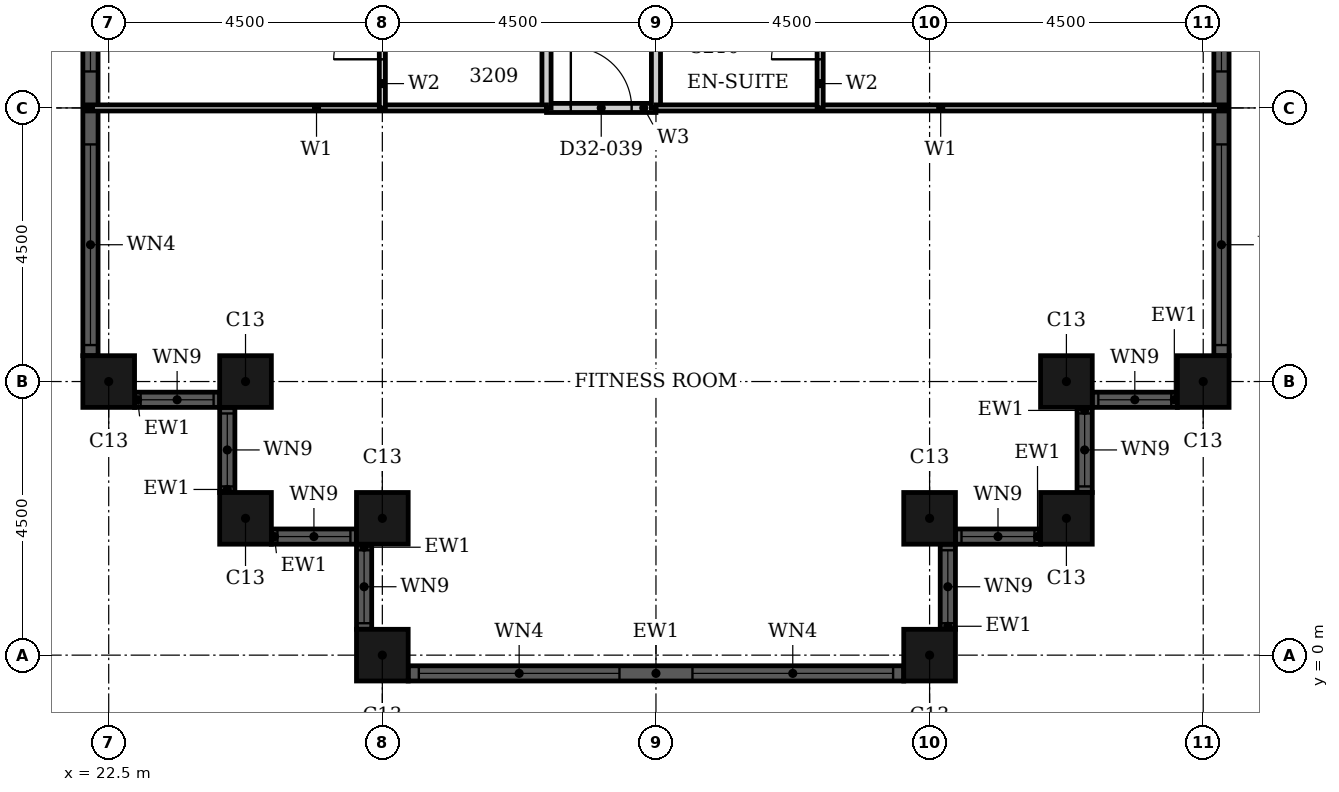
"""IFC4 building model, lengths in metres.
Left out: names, types, materials, properties, quantities, classifications, styles, units other than length and angle.
Written with IfcOpenShell. Run it as: python <this file> out.ifc"""

import sys

from ifc_helpers import new_model, si_unit, direction, frame, frame_2d, origin, origin_2d, place, context, subcontext, project, spatial, rectangle, hollow_rectangle, extrude, element, fill, save


model = new_model("IFC4")
c1 = context("Model", 3, precision=1e-05, world=origin(), true_north=direction((0.0, 1.0)))
c2 = subcontext(c1, "Body", "Model", "MODEL_VIEW")
j1 = project(units=[si_unit("LENGTHUNIT", "METRE"), si_unit("PLANEANGLEUNIT", "RADIAN")], contexts=[c1])
p1 = place(None, origin())
s1 = spatial("IfcSite", under=j1, at=p1, CompositionType="ELEMENT")
p2 = place(p1, origin())
s2 = spatial("IfcBuilding", under=s1, at=p2, CompositionType="ELEMENT")
p3 = place(p2, frame((0.0, 0.0, 129.6)))
s3 = spatial("IfcBuildingStorey", under=s2, at=p3, CompositionType="ELEMENT", Elevation=129.6)
for number, where, z_axis, x_axis in (
    (1, (22.5, 4.5, 0.0), (0.0, 0.0, 1.0), (1.0, 0.0, 0.0)),
    (2, (24.75, 4.5, 0.0), (0.0, 0.0, 1.0), (1.0, 0.0, 0.0)),
    (3, (24.75, 2.25, 0.0), (0.0, 0.0, 1.0), (1.0, 0.0, 0.0)),
    (4, (27.0, 2.25, 0.0), (0.0, 0.0, 1.0), (1.0, 0.0, 0.0)),
    (5, (27.0, 0.0, 0.0), (0.0, 0.0, 1.0), (1.0, 0.0, 0.0)),
    (6, (36.0, 0.0, 0.0), (0.0, 0.0, 1.0), (1.0, 0.0, 0.0)),
    (7, (36.0, 2.25, 0.0), (0.0, 0.0, 1.0), (1.0, 0.0, 0.0)),
    (8, (38.25, 2.25, 0.0), (0.0, 0.0, 1.0), (1.0, 0.0, 0.0)),
    (9, (38.25, 4.5, 0.0), (0.0, 0.0, 1.0), (1.0, 0.0, 0.0)),
    (10, (40.5, 4.5, 0.0), (0.0, 0.0, 1.0), (1.0, 0.0, 0.0)),
):
    element("IfcColumn", number, at=place(p3, frame(where, z_axis=z_axis, x_axis=x_axis)), inside=s3, PredefinedType="COLUMN", context=c2, shape_type="SweptSolid", body=[
        extrude(hollow_rectangle(XDim=0.85, YDim=0.85, WallThickness=0.026, at=origin_2d()), origin(), (0.0, 0.0, 1.0), 3.6),
    ])
p4 = place(p3, frame((22.925, 4.2, 0.0), z_axis=(0.0, 0.0, 1.0), x_axis=(1.0, 0.0, 0.0)))
e11 = element("IfcWall", 11, at=p4, inside=s3, PredefinedType="SOLIDWALL", context=c2, shape_type="SweptSolid", body=[
    extrude(rectangle(XDim=1.4, YDim=0.25, at=frame_2d((0.7, 0.0))), origin(), (0.0, 0.0, 1.0), 3.6),
])
p5 = place(p4, frame((0.1, 0.0, 0.9)))
e12 = element("IfcOpeningElement", 12, at=p5, cuts=e11, PredefinedType="OPENING", context=c2, shape_type="SweptSolid", body=[
    extrude(rectangle(XDim=1.2, YDim=2.08, at=frame_2d((0.6, 1.04))), frame((0.0, 0.135, 0.0), z_axis=(0.0, -1.0, 0.0), x_axis=(1.0, 0.0, 0.0)), (0.0, 0.0, 1.0), 0.27),
])
p6 = place(p3, frame((24.45, 4.075, 0.0), z_axis=(0.0, 0.0, 1.0), x_axis=(0.0, -1.0, 0.0)))
e13 = element("IfcWall", 13, at=p6, inside=s3, PredefinedType="SOLIDWALL", context=c2, shape_type="SweptSolid", body=[
    extrude(rectangle(XDim=1.4, YDim=0.25, at=frame_2d((0.7, 0.0))), origin(), (0.0, 0.0, 1.0), 3.6),
])
p7 = place(p6, frame((0.1, 0.0, 0.9)))
e14 = element("IfcOpeningElement", 14, at=p7, cuts=e13, PredefinedType="OPENING", context=c2, shape_type="SweptSolid", body=[
    extrude(rectangle(XDim=1.2, YDim=2.08, at=frame_2d((0.6, 1.04))), frame((0.0, 0.135, 0.0), z_axis=(0.0, -1.0, 0.0), x_axis=(1.0, 0.0, 0.0)), (0.0, 0.0, 1.0), 0.27),
])
p8 = place(p3, frame((25.175, 1.95, 0.0), z_axis=(0.0, 0.0, 1.0), x_axis=(1.0, 0.0, 0.0)))
e15 = element("IfcWall", 15, at=p8, inside=s3, PredefinedType="SOLIDWALL", context=c2, shape_type="SweptSolid", body=[
    extrude(rectangle(XDim=1.4, YDim=0.25, at=frame_2d((0.7, 0.0))), origin(), (0.0, 0.0, 1.0), 3.6),
])
p9 = place(p8, frame((0.1, 0.0, 0.9)))
e16 = element("IfcOpeningElement", 16, at=p9, cuts=e15, PredefinedType="OPENING", context=c2, shape_type="SweptSolid", body=[
    extrude(rectangle(XDim=1.2, YDim=2.08, at=frame_2d((0.6, 1.04))), frame((0.0, 0.135, 0.0), z_axis=(0.0, -1.0, 0.0), x_axis=(1.0, 0.0, 0.0)), (0.0, 0.0, 1.0), 0.27),
])
p10 = place(p3, frame((26.7, 1.825, 0.0), z_axis=(0.0, 0.0, 1.0), x_axis=(0.0, -1.0, 0.0)))
e17 = element("IfcWall", 17, at=p10, inside=s3, PredefinedType="SOLIDWALL", context=c2, shape_type="SweptSolid", body=[
    extrude(rectangle(XDim=1.4, YDim=0.25, at=frame_2d((0.7, 0.0))), origin(), (0.0, 0.0, 1.0), 3.6),
])
p11 = place(p10, frame((0.1, 0.0, 0.9)))
e18 = element("IfcOpeningElement", 18, at=p11, cuts=e17, PredefinedType="OPENING", context=c2, shape_type="SweptSolid", body=[
    extrude(rectangle(XDim=1.2, YDim=2.08, at=frame_2d((0.6, 1.04))), frame((0.0, 0.135, 0.0), z_axis=(0.0, -1.0, 0.0), x_axis=(1.0, 0.0, 0.0)), (0.0, 0.0, 1.0), 0.27),
])
p12 = place(p3, frame((27.425, -0.3, 0.0), z_axis=(0.0, 0.0, 1.0), x_axis=(1.0, 0.0, 0.0)))
e19 = element("IfcWall", 19, at=p12, inside=s3, PredefinedType="SOLIDWALL", context=c2, shape_type="SweptSolid", body=[
    extrude(rectangle(XDim=8.15, YDim=0.25, at=frame_2d((4.075, 0.0))), origin(), (0.0, 0.0, 1.0), 3.6),
])
p13 = place(p12, frame((0.175, 0.0, 0.9)))
e20 = element("IfcOpeningElement", 20, at=p13, cuts=e19, PredefinedType="OPENING", context=c2, shape_type="SweptSolid", body=[
    extrude(rectangle(XDim=3.3, YDim=2.08, at=frame_2d((1.65, 1.04))), frame((0.0, 0.135, 0.0), z_axis=(0.0, -1.0, 0.0), x_axis=(1.0, 0.0, 0.0)), (0.0, 0.0, 1.0), 0.27),
])
p14 = place(p12, frame((4.675, 0.0, 0.9)))
e21 = element("IfcOpeningElement", 21, at=p14, cuts=e19, PredefinedType="OPENING", context=c2, shape_type="SweptSolid", body=[
    extrude(rectangle(XDim=3.3, YDim=2.08, at=frame_2d((1.65, 1.04))), frame((0.0, 0.135, 0.0), z_axis=(0.0, -1.0, 0.0), x_axis=(1.0, 0.0, 0.0)), (0.0, 0.0, 1.0), 0.27),
])
p15 = place(p3, frame((36.3, 0.425, 0.0), z_axis=(0.0, 0.0, 1.0), x_axis=(0.0, 1.0, 0.0)))
e22 = element("IfcWall", 22, at=p15, inside=s3, PredefinedType="SOLIDWALL", context=c2, shape_type="SweptSolid", body=[
    extrude(rectangle(XDim=1.4, YDim=0.25, at=frame_2d((0.7, 0.0))), origin(), (0.0, 0.0, 1.0), 3.6),
])
p16 = place(p15, frame((0.1, 0.0, 0.9)))
e23 = element("IfcOpeningElement", 23, at=p16, cuts=e22, PredefinedType="OPENING", context=c2, shape_type="SweptSolid", body=[
    extrude(rectangle(XDim=1.2, YDim=2.08, at=frame_2d((0.6, 1.04))), frame((0.0, 0.135, 0.0), z_axis=(0.0, -1.0, 0.0), x_axis=(1.0, 0.0, 0.0)), (0.0, 0.0, 1.0), 0.27),
])
p17 = place(p3, frame((36.425, 1.95, 0.0), z_axis=(0.0, 0.0, 1.0), x_axis=(1.0, 0.0, 0.0)))
e24 = element("IfcWall", 24, at=p17, inside=s3, PredefinedType="SOLIDWALL", context=c2, shape_type="SweptSolid", body=[
    extrude(rectangle(XDim=1.4, YDim=0.25, at=frame_2d((0.7, 0.0))), origin(), (0.0, 0.0, 1.0), 3.6),
])
p18 = place(p17, frame((0.1, 0.0, 0.9)))
e25 = element("IfcOpeningElement", 25, at=p18, cuts=e24, PredefinedType="OPENING", context=c2, shape_type="SweptSolid", body=[
    extrude(rectangle(XDim=1.2, YDim=2.08, at=frame_2d((0.6, 1.04))), frame((0.0, 0.135, 0.0), z_axis=(0.0, -1.0, 0.0), x_axis=(1.0, 0.0, 0.0)), (0.0, 0.0, 1.0), 0.27),
])
p19 = place(p3, frame((38.55, 2.675, 0.0), z_axis=(0.0, 0.0, 1.0), x_axis=(0.0, 1.0, 0.0)))
e26 = element("IfcWall", 26, at=p19, inside=s3, PredefinedType="SOLIDWALL", context=c2, shape_type="SweptSolid", body=[
    extrude(rectangle(XDim=1.4, YDim=0.25, at=frame_2d((0.7, 0.0))), origin(), (0.0, 0.0, 1.0), 3.6),
])
p20 = place(p19, frame((0.1, 0.0, 0.9)))
e27 = element("IfcOpeningElement", 27, at=p20, cuts=e26, PredefinedType="OPENING", context=c2, shape_type="SweptSolid", body=[
    extrude(rectangle(XDim=1.2, YDim=2.08, at=frame_2d((0.6, 1.04))), frame((0.0, 0.135, 0.0), z_axis=(0.0, -1.0, 0.0), x_axis=(1.0, 0.0, 0.0)), (0.0, 0.0, 1.0), 0.27),
])
p21 = place(p3, frame((38.675, 4.2, 0.0), z_axis=(0.0, 0.0, 1.0), x_axis=(1.0, 0.0, 0.0)))
e28 = element("IfcWall", 28, at=p21, inside=s3, PredefinedType="SOLIDWALL", context=c2, shape_type="SweptSolid", body=[
    extrude(rectangle(XDim=1.4, YDim=0.25, at=frame_2d((0.7, 0.0))), origin(), (0.0, 0.0, 1.0), 3.6),
])
p22 = place(p21, frame((0.1, 0.0, 0.9)))
e29 = element("IfcOpeningElement", 29, at=p22, cuts=e28, PredefinedType="OPENING", context=c2, shape_type="SweptSolid", body=[
    extrude(rectangle(XDim=1.2, YDim=2.08, at=frame_2d((0.6, 1.04))), frame((0.0, 0.135, 0.0), z_axis=(0.0, -1.0, 0.0), x_axis=(1.0, 0.0, 0.0)), (0.0, 0.0, 1.0), 0.27),
])
p23 = place(p3, frame((40.8, 4.925, 0.0), z_axis=(0.0, 0.0, 1.0), x_axis=(0.0, 1.0, 0.0)))
e30 = element("IfcWall", 30, at=p23, inside=s3, PredefinedType="SOLIDWALL", context=c2, shape_type="SweptSolid", body=[
    extrude(rectangle(XDim=8.15, YDim=0.25, at=frame_2d((4.075, 0.0))), origin(), (0.0, 0.0, 1.0), 3.6),
])
p24 = place(p23, frame((0.175, 0.0, 0.9)))
e31 = element("IfcOpeningElement", 31, at=p24, cuts=e30, PredefinedType="OPENING", context=c2, shape_type="SweptSolid", body=[
    extrude(rectangle(XDim=3.3, YDim=2.08, at=frame_2d((1.65, 1.04))), frame((0.0, 0.135, 0.0), z_axis=(0.0, -1.0, 0.0), x_axis=(1.0, 0.0, 0.0)), (0.0, 0.0, 1.0), 0.27),
])
p25 = place(p23, frame((4.675, 0.0, 0.9)))
e32 = element("IfcOpeningElement", 32, at=p25, cuts=e30, PredefinedType="OPENING", context=c2, shape_type="SweptSolid", body=[
    extrude(rectangle(XDim=3.3, YDim=2.08, at=frame_2d((1.65, 1.04))), frame((0.0, 0.135, 0.0), z_axis=(0.0, -1.0, 0.0), x_axis=(1.0, 0.0, 0.0)), (0.0, 0.0, 1.0), 0.27),
])
p26 = place(p3, frame((22.2, 13.075, 0.0), z_axis=(0.0, 0.0, 1.0), x_axis=(0.0, -1.0, 0.0)))
e33 = element("IfcWall", 33, at=p26, inside=s3, PredefinedType="SOLIDWALL", context=c2, shape_type="SweptSolid", body=[
    extrude(rectangle(XDim=8.15, YDim=0.25, at=frame_2d((4.075, 0.0))), origin(), (0.0, 0.0, 1.0), 3.6),
])
p27 = place(p26, frame((0.175, 0.0, 0.9)))
e34 = element("IfcOpeningElement", 34, at=p27, cuts=e33, PredefinedType="OPENING", context=c2, shape_type="SweptSolid", body=[
    extrude(rectangle(XDim=3.3, YDim=2.08, at=frame_2d((1.65, 1.04))), frame((0.0, 0.135, 0.0), z_axis=(0.0, -1.0, 0.0), x_axis=(1.0, 0.0, 0.0)), (0.0, 0.0, 1.0), 0.27),
])
p28 = place(p26, frame((4.675, 0.0, 0.9)))
e35 = element("IfcOpeningElement", 35, at=p28, cuts=e33, PredefinedType="OPENING", context=c2, shape_type="SweptSolid", body=[
    extrude(rectangle(XDim=3.3, YDim=2.08, at=frame_2d((1.65, 1.04))), frame((0.0, 0.135, 0.0), z_axis=(0.0, -1.0, 0.0), x_axis=(1.0, 0.0, 0.0)), (0.0, 0.0, 1.0), 0.27),
])
p29 = place(p3, frame((29.7, 9.0, 0.0), z_axis=(0.0, 0.0, 1.0), x_axis=(1.0, 0.0, 0.0)))
e36 = element("IfcWall", 36, at=p29, inside=s3, PredefinedType="PARTITIONING", context=c2, shape_type="SweptSolid", body=[
    extrude(rectangle(XDim=1.8, YDim=0.15, at=frame_2d((0.9, 0.0))), origin(), (0.0, 0.0, 1.0), 3.3),
])
p30 = place(p29, frame((0.4, 0.0, 0.0)))
e37 = element("IfcOpeningElement", 37, at=p30, cuts=e36, PredefinedType="OPENING", context=c2, shape_type="SweptSolid", body=[
    extrude(rectangle(XDim=1.0, YDim=2.1, at=frame_2d((0.5, 1.05))), frame((0.0, 0.085, 0.0), z_axis=(0.0, -1.0, 0.0), x_axis=(1.0, 0.0, 0.0)), (0.0, 0.0, 1.0), 0.17),
])
p31 = place(p3, frame((29.7, 9.0, 0.0), z_axis=(0.0, 0.0, 1.0), x_axis=(0.0, 1.0, 0.0)))
e38 = element("IfcWall", 38, at=p31, inside=s3, PredefinedType="PARTITIONING", context=c2, shape_type="SweptSolid", body=[
    extrude(rectangle(XDim=11.7, YDim=0.15, at=frame_2d((5.85, 0.0))), origin(), (0.0, 0.0, 1.0), 3.3),
])
p32 = place(p31, frame((2.95, 0.0, 0.0)))
e39 = element("IfcOpeningElement", 39, at=p32, cuts=e38, PredefinedType="OPENING", context=c2, shape_type="SweptSolid", body=[
    extrude(rectangle(XDim=1.0, YDim=2.1, at=frame_2d((0.5, 1.05))), frame((0.0, 0.085, 0.0), z_axis=(0.0, -1.0, 0.0), x_axis=(1.0, 0.0, 0.0)), (0.0, 0.0, 1.0), 0.17),
])
p33 = place(p3, frame((31.5, 9.0, 0.0), z_axis=(0.0, 0.0, 1.0), x_axis=(0.0, 1.0, 0.0)))
e40 = element("IfcWall", 40, at=p33, inside=s3, PredefinedType="PARTITIONING", context=c2, shape_type="SweptSolid", body=[
    extrude(rectangle(XDim=11.7, YDim=0.15, at=frame_2d((5.85, 0.0))), origin(), (0.0, 0.0, 1.0), 2.58),
])
p34 = place(p33, frame((2.95, 0.0, 0.0)))
e41 = element("IfcOpeningElement", 41, at=p34, cuts=e40, PredefinedType="OPENING", context=c2, shape_type="SweptSolid", body=[
    extrude(rectangle(XDim=1.0, YDim=2.1, at=frame_2d((0.5, 1.05))), frame((0.0, 0.085, 0.0), z_axis=(0.0, -1.0, 0.0), x_axis=(1.0, 0.0, 0.0)), (0.0, 0.0, 1.0), 0.17),
])
p35 = place(p3, frame((31.5, 9.0, 0.0), z_axis=(0.0, 0.0, 1.0), x_axis=(1.0, 0.0, 0.0)))
e42 = element("IfcWall", 42, at=p35, inside=s3, PredefinedType="PARTITIONING", context=c2, shape_type="SweptSolid", body=[
    extrude(rectangle(XDim=9.365, YDim=0.1, at=frame_2d((4.683, 0.0))), origin(), (0.0, 0.0, 1.0), 3.3),
])
p36 = place(p3, frame((22.135, 9.0, 0.0), z_axis=(0.0, 0.0, 1.0), x_axis=(1.0, 0.0, 0.0)))
e43 = element("IfcWall", 43, at=p36, inside=s3, PredefinedType="PARTITIONING", context=c2, shape_type="SweptSolid", body=[
    extrude(rectangle(XDim=7.565, YDim=0.1, at=frame_2d((3.782, 0.0))), origin(), (0.0, 0.0, 1.0), 3.3),
])
p37 = place(p3, frame((27.0, 9.0, 0.0), z_axis=(0.0, 0.0, 1.0), x_axis=(0.0, 1.0, 0.0)))
e44 = element("IfcWall", 44, at=p37, inside=s3, PredefinedType="PARTITIONING", context=c2, shape_type="SweptSolid", body=[
    extrude(rectangle(XDim=2.4, YDim=0.1, at=frame_2d((1.2, 0.0))), origin(), (0.0, 0.0, 1.0), 2.58),
])
p38 = place(p37, frame((0.8, 0.0, 0.0)))
e45 = element("IfcOpeningElement", 45, at=p38, cuts=e44, PredefinedType="OPENING", context=c2, shape_type="SweptSolid", body=[
    extrude(rectangle(XDim=0.8, YDim=2.1, at=frame_2d((0.4, 1.05))), frame((0.0, 0.06, 0.0), z_axis=(0.0, -1.0, 0.0), x_axis=(1.0, 0.0, 0.0)), (0.0, 0.0, 1.0), 0.12),
])
p39 = place(p3, frame((34.2, 9.0, 0.0), z_axis=(0.0, 0.0, 1.0), x_axis=(0.0, 1.0, 0.0)))
e46 = element("IfcWall", 46, at=p39, inside=s3, PredefinedType="PARTITIONING", context=c2, shape_type="SweptSolid", body=[
    extrude(rectangle(XDim=2.4, YDim=0.1, at=frame_2d((1.2, 0.0))), origin(), (0.0, 0.0, 1.0), 3.3),
])
p40 = place(p39, frame((0.8, 0.0, 0.0)))
e47 = element("IfcOpeningElement", 47, at=p40, cuts=e46, PredefinedType="OPENING", context=c2, shape_type="SweptSolid", body=[
    extrude(rectangle(XDim=0.8, YDim=2.1, at=frame_2d((0.4, 1.05))), frame((0.0, 0.06, 0.0), z_axis=(0.0, -1.0, 0.0), x_axis=(1.0, 0.0, 0.0)), (0.0, 0.0, 1.0), 0.12),
])
p41 = place(p5, origin())
e48 = element("IfcWindow", 48, at=p41, inside=s3, PartitioningType="SINGLE_PANEL", PredefinedType="WINDOW", context=c2, shape_type="SweptSolid", body=[
    extrude(rectangle(XDim=1.2, YDim=2.08, at=frame_2d((0.6, 1.04))), frame((0.0, 0.03, 0.0), z_axis=(0.0, -1.0, 0.0), x_axis=(1.0, 0.0, 0.0)), (0.0, 0.0, 1.0), 0.06),
])
fill(e12, e48)
p42 = place(p7, origin())
e49 = element("IfcWindow", 49, at=p42, inside=s3, PartitioningType="SINGLE_PANEL", PredefinedType="WINDOW", context=c2, shape_type="SweptSolid", body=[
    extrude(rectangle(XDim=1.2, YDim=2.08, at=frame_2d((0.6, 1.04))), frame((0.0, 0.03, 0.0), z_axis=(0.0, -1.0, 0.0), x_axis=(1.0, 0.0, 0.0)), (0.0, 0.0, 1.0), 0.06),
])
fill(e14, e49)
p43 = place(p9, origin())
e50 = element("IfcWindow", 50, at=p43, inside=s3, PartitioningType="SINGLE_PANEL", PredefinedType="WINDOW", context=c2, shape_type="SweptSolid", body=[
    extrude(rectangle(XDim=1.2, YDim=2.08, at=frame_2d((0.6, 1.04))), frame((0.0, 0.03, 0.0), z_axis=(0.0, -1.0, 0.0), x_axis=(1.0, 0.0, 0.0)), (0.0, 0.0, 1.0), 0.06),
])
fill(e16, e50)
p44 = place(p11, origin())
e51 = element("IfcWindow", 51, at=p44, inside=s3, PartitioningType="SINGLE_PANEL", PredefinedType="WINDOW", context=c2, shape_type="SweptSolid", body=[
    extrude(rectangle(XDim=1.2, YDim=2.08, at=frame_2d((0.6, 1.04))), frame((0.0, 0.03, 0.0), z_axis=(0.0, -1.0, 0.0), x_axis=(1.0, 0.0, 0.0)), (0.0, 0.0, 1.0), 0.06),
])
fill(e18, e51)
p45 = place(p13, origin())
e52 = element("IfcWindow", 52, at=p45, inside=s3, PartitioningType="SINGLE_PANEL", PredefinedType="WINDOW", context=c2, shape_type="SweptSolid", body=[
    extrude(rectangle(XDim=3.3, YDim=2.08, at=frame_2d((1.65, 1.04))), frame((0.0, 0.03, 0.0), z_axis=(0.0, -1.0, 0.0), x_axis=(1.0, 0.0, 0.0)), (0.0, 0.0, 1.0), 0.06),
])
fill(e20, e52)
p46 = place(p14, origin())
e53 = element("IfcWindow", 53, at=p46, inside=s3, PartitioningType="SINGLE_PANEL", PredefinedType="WINDOW", context=c2, shape_type="SweptSolid", body=[
    extrude(rectangle(XDim=3.3, YDim=2.08, at=frame_2d((1.65, 1.04))), frame((0.0, 0.03, 0.0), z_axis=(0.0, -1.0, 0.0), x_axis=(1.0, 0.0, 0.0)), (0.0, 0.0, 1.0), 0.06),
])
fill(e21, e53)
p47 = place(p16, origin())
e54 = element("IfcWindow", 54, at=p47, inside=s3, PartitioningType="SINGLE_PANEL", PredefinedType="WINDOW", context=c2, shape_type="SweptSolid", body=[
    extrude(rectangle(XDim=1.2, YDim=2.08, at=frame_2d((0.6, 1.04))), frame((0.0, 0.03, 0.0), z_axis=(0.0, -1.0, 0.0), x_axis=(1.0, 0.0, 0.0)), (0.0, 0.0, 1.0), 0.06),
])
fill(e23, e54)
p48 = place(p18, origin())
e55 = element("IfcWindow", 55, at=p48, inside=s3, PartitioningType="SINGLE_PANEL", PredefinedType="WINDOW", context=c2, shape_type="SweptSolid", body=[
    extrude(rectangle(XDim=1.2, YDim=2.08, at=frame_2d((0.6, 1.04))), frame((0.0, 0.03, 0.0), z_axis=(0.0, -1.0, 0.0), x_axis=(1.0, 0.0, 0.0)), (0.0, 0.0, 1.0), 0.06),
])
fill(e25, e55)
p49 = place(p20, origin())
e56 = element("IfcWindow", 56, at=p49, inside=s3, PartitioningType="SINGLE_PANEL", PredefinedType="WINDOW", context=c2, shape_type="SweptSolid", body=[
    extrude(rectangle(XDim=1.2, YDim=2.08, at=frame_2d((0.6, 1.04))), frame((0.0, 0.03, 0.0), z_axis=(0.0, -1.0, 0.0), x_axis=(1.0, 0.0, 0.0)), (0.0, 0.0, 1.0), 0.06),
])
fill(e27, e56)
p50 = place(p22, origin())
e57 = element("IfcWindow", 57, at=p50, inside=s3, PartitioningType="SINGLE_PANEL", PredefinedType="WINDOW", context=c2, shape_type="SweptSolid", body=[
    extrude(rectangle(XDim=1.2, YDim=2.08, at=frame_2d((0.6, 1.04))), frame((0.0, 0.03, 0.0), z_axis=(0.0, -1.0, 0.0), x_axis=(1.0, 0.0, 0.0)), (0.0, 0.0, 1.0), 0.06),
])
fill(e29, e57)
p51 = place(p24, origin())
e58 = element("IfcWindow", 58, at=p51, inside=s3, PartitioningType="SINGLE_PANEL", PredefinedType="WINDOW", context=c2, shape_type="SweptSolid", body=[
    extrude(rectangle(XDim=3.3, YDim=2.08, at=frame_2d((1.65, 1.04))), frame((0.0, 0.03, 0.0), z_axis=(0.0, -1.0, 0.0), x_axis=(1.0, 0.0, 0.0)), (0.0, 0.0, 1.0), 0.06),
])
fill(e31, e58)
p52 = place(p25, origin())
e59 = element("IfcWindow", 59, at=p52, inside=s3, PartitioningType="SINGLE_PANEL", PredefinedType="WINDOW", context=c2, shape_type="SweptSolid", body=[
    extrude(rectangle(XDim=3.3, YDim=2.08, at=frame_2d((1.65, 1.04))), frame((0.0, 0.03, 0.0), z_axis=(0.0, -1.0, 0.0), x_axis=(1.0, 0.0, 0.0)), (0.0, 0.0, 1.0), 0.06),
])
fill(e32, e59)
p53 = place(p27, origin())
e60 = element("IfcWindow", 60, at=p53, inside=s3, PartitioningType="SINGLE_PANEL", PredefinedType="WINDOW", context=c2, shape_type="SweptSolid", body=[
    extrude(rectangle(XDim=3.3, YDim=2.08, at=frame_2d((1.65, 1.04))), frame((0.0, 0.03, 0.0), z_axis=(0.0, -1.0, 0.0), x_axis=(1.0, 0.0, 0.0)), (0.0, 0.0, 1.0), 0.06),
])
fill(e34, e60)
p54 = place(p28, origin())
e61 = element("IfcWindow", 61, at=p54, inside=s3, PartitioningType="SINGLE_PANEL", PredefinedType="WINDOW", context=c2, shape_type="SweptSolid", body=[
    extrude(rectangle(XDim=3.3, YDim=2.08, at=frame_2d((1.65, 1.04))), frame((0.0, 0.03, 0.0), z_axis=(0.0, -1.0, 0.0), x_axis=(1.0, 0.0, 0.0)), (0.0, 0.0, 1.0), 0.06),
])
fill(e35, e61)
p55 = place(p38, origin())
e62 = element("IfcDoor", 62, at=p55, inside=s3, OperationType="SINGLE_SWING_RIGHT", PredefinedType="DOOR", context=c2, shape_type="SweptSolid", body=[
    extrude(rectangle(XDim=0.8, YDim=2.1, at=frame_2d((0.4, 1.05))), frame((0.0, 0.025, 0.0), z_axis=(0.0, -1.0, 0.0), x_axis=(1.0, 0.0, 0.0)), (0.0, 0.0, 1.0), 0.05),
])
fill(e45, e62)
p56 = place(p40, origin())
e63 = element("IfcDoor", 63, at=p56, inside=s3, OperationType="SINGLE_SWING_LEFT", PredefinedType="DOOR", context=c2, shape_type="SweptSolid", body=[
    extrude(rectangle(XDim=0.8, YDim=2.1, at=frame_2d((0.4, 1.05))), frame((0.0, 0.025, 0.0), z_axis=(0.0, -1.0, 0.0), x_axis=(1.0, 0.0, 0.0)), (0.0, 0.0, 1.0), 0.05),
])
fill(e47, e63)
p57 = place(p30, origin())
e64 = element("IfcDoor", 64, at=p57, inside=s3, OperationType="SINGLE_SWING_RIGHT", PredefinedType="DOOR", context=c2, shape_type="SweptSolid", body=[
    extrude(rectangle(XDim=1.0, YDim=2.1, at=frame_2d((0.5, 1.05))), frame((0.0, 0.025, 0.0), z_axis=(0.0, -1.0, 0.0), x_axis=(1.0, 0.0, 0.0)), (0.0, 0.0, 1.0), 0.05),
])
fill(e37, e64)
save(model, sys.argv[1])
